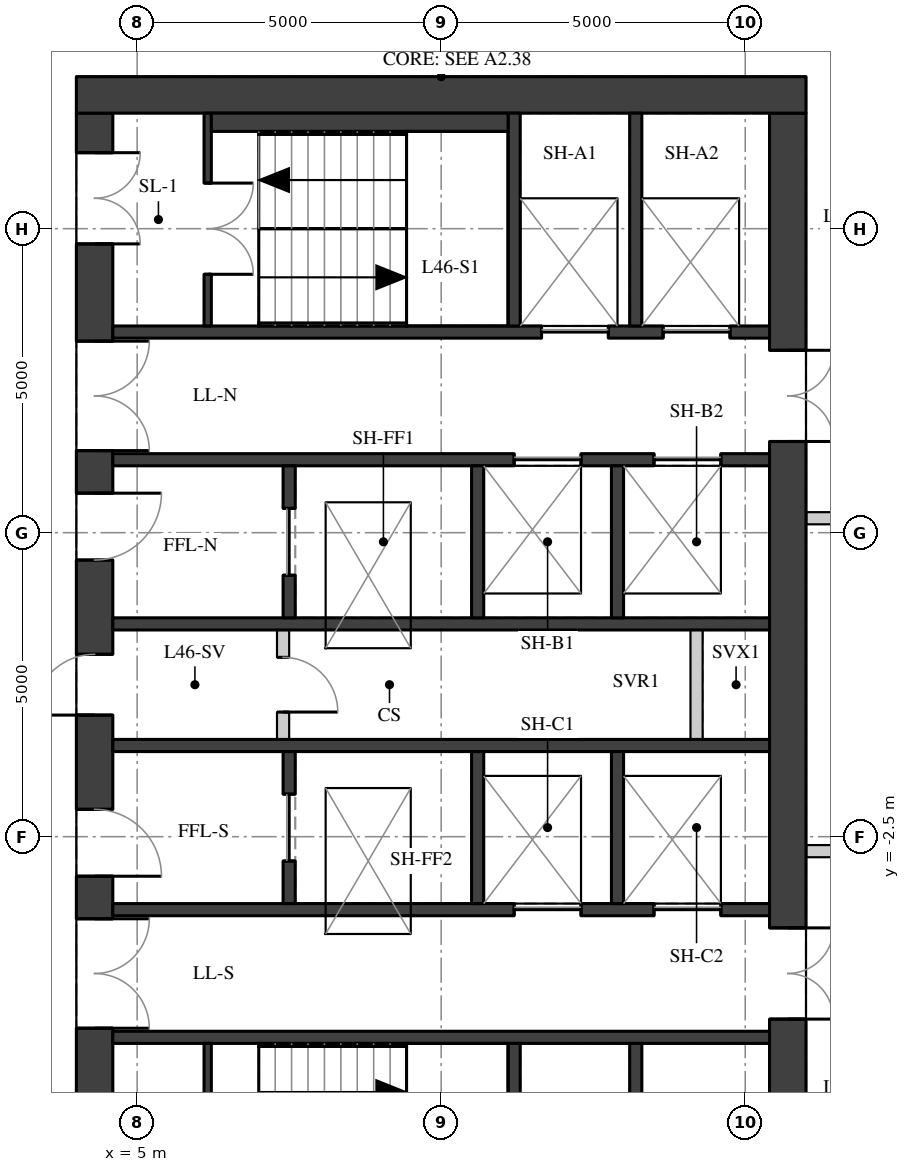
"""IFC4 building model, lengths in metres.
Left out: names, types, materials, properties, quantities, classifications, styles, units other than length and angle.
Written with IfcOpenShell. Run it as: python <this file> out.ifc"""

import sys

from ifc_helpers import new_model, si_unit, direction, frame, frame_2d, origin, place, context, subcontext, project, spatial, rectangle, extrude, element, fill, save


model = new_model("IFC4")
c1 = context("Model", 3, precision=1e-05, world=origin(), true_north=direction((0.0, 1.0)))
c2 = subcontext(c1, "Body", "Model", "MODEL_VIEW")
j1 = project(units=[si_unit("LENGTHUNIT", "METRE"), si_unit("PLANEANGLEUNIT", "RADIAN")], contexts=[c1])
p1 = place(None, origin())
s1 = spatial("IfcSite", under=j1, at=p1, CompositionType="ELEMENT")
p2 = place(p1, origin())
s2 = spatial("IfcBuilding", under=s1, at=p2, CompositionType="ELEMENT")
p3 = place(p2, frame((0.0, 0.0, 164.9)))
s3 = spatial("IfcBuildingStorey", under=s2, at=p3, CompositionType="ELEMENT", Elevation=164.9)
p4 = place(p3, frame((4.3, -9.4, 0.0), z_axis=(0.0, 0.0, 1.0), x_axis=(0.0, 1.0, 0.0)))
e1 = element("IfcWall", 1, at=p4, inside=s3, PredefinedType="SHEAR", context=c2, shape_type="SweptSolid", body=[
    extrude(rectangle(XDim=18.8, YDim=0.6, at=frame_2d((9.4, 0.0))), origin(), (0.0, 0.0, 1.0), 3.02),
])
p5 = place(p4, frame((0.65, 0.0, 0.0)))
e2 = element("IfcOpeningElement", 2, at=p5, cuts=e1, PredefinedType="OPENING", context=c2, shape_type="SweptSolid", body=[
    extrude(rectangle(XDim=1.5, YDim=2.1, at=frame_2d((0.75, 1.05))), frame((0.0, 0.31, 0.0), z_axis=(0.0, -1.0, 0.0), x_axis=(1.0, 0.0, 0.0)), (0.0, 0.0, 1.0), 0.62),
])
p6 = place(p4, frame((3.75, 0.0, 0.0)))
e3 = element("IfcOpeningElement", 3, at=p6, cuts=e1, PredefinedType="OPENING", context=c2, shape_type="SweptSolid", body=[
    extrude(rectangle(XDim=1.8, YDim=2.1, at=frame_2d((0.9, 1.05))), frame((0.0, 0.31, 0.0), z_axis=(0.0, -1.0, 0.0), x_axis=(1.0, 0.0, 0.0)), (0.0, 0.0, 1.0), 0.62),
])
p7 = place(p4, frame((6.25, 0.0, 0.0)))
e4 = element("IfcOpeningElement", 4, at=p7, cuts=e1, PredefinedType="OPENING", context=c2, shape_type="SweptSolid", body=[
    extrude(rectangle(XDim=1.1, YDim=2.1, at=frame_2d((0.55, 1.05))), frame((0.0, 0.31, 0.0), z_axis=(0.0, -1.0, 0.0), x_axis=(1.0, 0.0, 0.0)), (0.0, 0.0, 1.0), 0.62),
])
p8 = place(p4, frame((8.9, 0.0, 0.0)))
e5 = element("IfcOpeningElement", 5, at=p8, cuts=e1, PredefinedType="OPENING", context=c2, shape_type="SweptSolid", body=[
    extrude(rectangle(XDim=1.0, YDim=2.1, at=frame_2d((0.5, 1.05))), frame((0.0, 0.31, 0.0), z_axis=(0.0, -1.0, 0.0), x_axis=(1.0, 0.0, 0.0)), (0.0, 0.0, 1.0), 0.62),
])
p9 = place(p4, frame((11.45, 0.0, 0.0)))
e6 = element("IfcOpeningElement", 6, at=p9, cuts=e1, PredefinedType="OPENING", context=c2, shape_type="SweptSolid", body=[
    extrude(rectangle(XDim=1.1, YDim=2.1, at=frame_2d((0.55, 1.05))), frame((0.0, 0.31, 0.0), z_axis=(0.0, -1.0, 0.0), x_axis=(1.0, 0.0, 0.0)), (0.0, 0.0, 1.0), 0.62),
])
p10 = place(p4, frame((13.25, 0.0, 0.0)))
e7 = element("IfcOpeningElement", 7, at=p10, cuts=e1, PredefinedType="OPENING", context=c2, shape_type="SweptSolid", body=[
    extrude(rectangle(XDim=1.8, YDim=2.1, at=frame_2d((0.9, 1.05))), frame((0.0, 0.31, 0.0), z_axis=(0.0, -1.0, 0.0), x_axis=(1.0, 0.0, 0.0)), (0.0, 0.0, 1.0), 0.62),
])
p11 = place(p4, frame((16.65, 0.0, 0.0)))
e8 = element("IfcOpeningElement", 8, at=p11, cuts=e1, PredefinedType="OPENING", context=c2, shape_type="SweptSolid", body=[
    extrude(rectangle(XDim=1.5, YDim=2.1, at=frame_2d((0.75, 1.05))), frame((0.0, 0.31, 0.0), z_axis=(0.0, -1.0, 0.0), x_axis=(1.0, 0.0, 0.0)), (0.0, 0.0, 1.0), 0.62),
])
p12 = place(p3, frame((15.7, -9.4, 0.0), z_axis=(0.0, 0.0, 1.0), x_axis=(0.0, 1.0, 0.0)))
e9 = element("IfcWall", 9, at=p12, inside=s3, PredefinedType="SHEAR", context=c2, shape_type="SweptSolid", body=[
    extrude(rectangle(XDim=18.8, YDim=0.6, at=frame_2d((9.4, 0.0))), origin(), (0.0, 0.0, 1.0), 3.02),
])
p13 = place(p12, frame((13.4, 0.0, 0.0)))
e10 = element("IfcOpeningElement", 10, at=p13, cuts=e9, PredefinedType="OPENING", context=c2, shape_type="SweptSolid", body=[
    extrude(rectangle(XDim=1.5, YDim=2.1, at=frame_2d((0.75, 1.05))), frame((0.0, 0.31, 0.0), z_axis=(0.0, -1.0, 0.0), x_axis=(1.0, 0.0, 0.0)), (0.0, 0.0, 1.0), 0.62),
])
p14 = place(p12, frame((3.9, 0.0, 0.0)))
e11 = element("IfcOpeningElement", 11, at=p14, cuts=e9, PredefinedType="OPENING", context=c2, shape_type="SweptSolid", body=[
    extrude(rectangle(XDim=1.5, YDim=2.1, at=frame_2d((0.75, 1.05))), frame((0.0, 0.31, 0.0), z_axis=(0.0, -1.0, 0.0), x_axis=(1.0, 0.0, 0.0)), (0.0, 0.0, 1.0), 0.62),
])
p15 = place(p3, frame((4.0, 9.7, 0.0), z_axis=(0.0, 0.0, 1.0), x_axis=(1.0, 0.0, 0.0)))
e12 = element("IfcWall", 12, at=p15, inside=s3, PredefinedType="SHEAR", context=c2, shape_type="SweptSolid", body=[
    extrude(rectangle(XDim=12.0, YDim=0.6, at=frame_2d((6.0, 0.0))), origin(), (0.0, 0.0, 1.0), 3.02),
])
p16 = place(p3, frame((4.6, 5.8, 0.0), z_axis=(0.0, 0.0, 1.0), x_axis=(1.0, 0.0, 0.0)))
e13 = element("IfcWall", 13, at=p16, inside=s3, PredefinedType="SHEAR", context=c2, shape_type="SweptSolid", body=[
    extrude(rectangle(XDim=10.8, YDim=0.2, at=frame_2d((5.4, 0.0))), origin(), (0.0, 0.0, 1.0), 3.02),
])
p17 = place(p16, frame((7.05, 0.0, 0.0)))
e14 = element("IfcOpeningElement", 14, at=p17, cuts=e13, PredefinedType="OPENING", context=c2, shape_type="SweptSolid", body=[
    extrude(rectangle(XDim=1.1, YDim=2.1, at=frame_2d((0.55, 1.05))), frame((0.0, 0.11, 0.0), z_axis=(0.0, -1.0, 0.0), x_axis=(1.0, 0.0, 0.0)), (0.0, 0.0, 1.0), 0.22),
])
p18 = place(p16, frame((9.05, 0.0, 0.0)))
e15 = element("IfcOpeningElement", 15, at=p18, cuts=e13, PredefinedType="OPENING", context=c2, shape_type="SweptSolid", body=[
    extrude(rectangle(XDim=1.1, YDim=2.1, at=frame_2d((0.55, 1.05))), frame((0.0, 0.11, 0.0), z_axis=(0.0, -1.0, 0.0), x_axis=(1.0, 0.0, 0.0)), (0.0, 0.0, 1.0), 0.22),
])
p19 = place(p3, frame((4.6, 3.7, 0.0), z_axis=(0.0, 0.0, 1.0), x_axis=(1.0, 0.0, 0.0)))
e16 = element("IfcWall", 16, at=p19, inside=s3, PredefinedType="SHEAR", context=c2, shape_type="SweptSolid", body=[
    extrude(rectangle(XDim=10.8, YDim=0.2, at=frame_2d((5.4, 0.0))), origin(), (0.0, 0.0, 1.0), 3.02),
])
p20 = place(p19, frame((6.6, 0.0, 0.0)))
e17 = element("IfcOpeningElement", 17, at=p20, cuts=e16, PredefinedType="OPENING", context=c2, shape_type="SweptSolid", body=[
    extrude(rectangle(XDim=1.1, YDim=2.1, at=frame_2d((0.55, 1.05))), frame((0.0, 0.11, 0.0), z_axis=(0.0, -1.0, 0.0), x_axis=(1.0, 0.0, 0.0)), (0.0, 0.0, 1.0), 0.22),
])
p21 = place(p19, frame((8.9, 0.0, 0.0)))
e18 = element("IfcOpeningElement", 18, at=p21, cuts=e16, PredefinedType="OPENING", context=c2, shape_type="SweptSolid", body=[
    extrude(rectangle(XDim=1.1, YDim=2.1, at=frame_2d((0.55, 1.05))), frame((0.0, 0.11, 0.0), z_axis=(0.0, -1.0, 0.0), x_axis=(1.0, 0.0, 0.0)), (0.0, 0.0, 1.0), 0.22),
])
for number, where, z_axis, x_axis in (
    (19, (4.6, 1.0, 0.0), (0.0, 0.0, 1.0), (1.0, 0.0, 0.0)),
    (20, (4.6, -1.0, 0.0), (0.0, 0.0, 1.0), (1.0, 0.0, 0.0)),
):
    element("IfcWall", number, at=place(p3, frame(where, z_axis=z_axis, x_axis=x_axis)), inside=s3, PredefinedType="SHEAR", context=c2, shape_type="SweptSolid", body=[
        extrude(rectangle(XDim=10.8, YDim=0.2, at=frame_2d((5.4, 0.0))), origin(), (0.0, 0.0, 1.0), 3.02),
    ])
p22 = place(p3, frame((4.6, -3.7, 0.0), z_axis=(0.0, 0.0, 1.0), x_axis=(1.0, 0.0, 0.0)))
e21 = element("IfcWall", 21, at=p22, inside=s3, PredefinedType="SHEAR", context=c2, shape_type="SweptSolid", body=[
    extrude(rectangle(XDim=10.8, YDim=0.2, at=frame_2d((5.4, 0.0))), origin(), (0.0, 0.0, 1.0), 3.02),
])
p23 = place(p22, frame((6.6, 0.0, 0.0)))
e22 = element("IfcOpeningElement", 22, at=p23, cuts=e21, PredefinedType="OPENING", context=c2, shape_type="SweptSolid", body=[
    extrude(rectangle(XDim=1.1, YDim=2.1, at=frame_2d((0.55, 1.05))), frame((0.0, 0.11, 0.0), z_axis=(0.0, -1.0, 0.0), x_axis=(1.0, 0.0, 0.0)), (0.0, 0.0, 1.0), 0.22),
])
p24 = place(p22, frame((8.9, 0.0, 0.0)))
e23 = element("IfcOpeningElement", 23, at=p24, cuts=e21, PredefinedType="OPENING", context=c2, shape_type="SweptSolid", body=[
    extrude(rectangle(XDim=1.1, YDim=2.1, at=frame_2d((0.55, 1.05))), frame((0.0, 0.11, 0.0), z_axis=(0.0, -1.0, 0.0), x_axis=(1.0, 0.0, 0.0)), (0.0, 0.0, 1.0), 0.22),
])
p25 = place(p3, frame((4.6, -5.8, 0.0), z_axis=(0.0, 0.0, 1.0), x_axis=(1.0, 0.0, 0.0)))
e24 = element("IfcWall", 24, at=p25, inside=s3, PredefinedType="SHEAR", context=c2, shape_type="SweptSolid", body=[
    extrude(rectangle(XDim=10.8, YDim=0.2, at=frame_2d((5.4, 0.0))), origin(), (0.0, 0.0, 1.0), 3.02),
])
for number, where, z_axis, x_axis in (
    (25, (11.2, 5.9, 0.0), (0.0, 0.0, 1.0), (0.0, 1.0, 0.0)),
    (26, (11.2, -9.4, 0.0), (0.0, 0.0, 1.0), (0.0, 1.0, 0.0)),
    (27, (13.2, 5.9, 0.0), (0.0, 0.0, 1.0), (0.0, 1.0, 0.0)),
    (28, (13.2, -9.4, 0.0), (0.0, 0.0, 1.0), (0.0, 1.0, 0.0)),
):
    element("IfcWall", number, at=place(p3, frame(where, z_axis=z_axis, x_axis=x_axis)), inside=s3, PredefinedType="SHEAR", context=c2, shape_type="SweptSolid", body=[
        extrude(rectangle(XDim=3.5, YDim=0.2, at=frame_2d((1.75, 0.0))), origin(), (0.0, 0.0, 1.0), 3.02),
    ])
p26 = place(p3, frame((7.5, 1.1, 0.0), z_axis=(0.0, 0.0, 1.0), x_axis=(0.0, 1.0, 0.0)))
e29 = element("IfcWall", 29, at=p26, inside=s3, PredefinedType="SHEAR", context=c2, shape_type="SweptSolid", body=[
    extrude(rectangle(XDim=2.5, YDim=0.2, at=frame_2d((1.25, 0.0))), origin(), (0.0, 0.0, 1.0), 3.02),
])
p27 = place(p26, frame((0.7, 0.0, 0.0)))
e30 = element("IfcOpeningElement", 30, at=p27, cuts=e29, PredefinedType="OPENING", context=c2, shape_type="SweptSolid", body=[
    extrude(rectangle(XDim=1.1, YDim=2.1, at=frame_2d((0.55, 1.05))), frame((0.0, 0.11, 0.0), z_axis=(0.0, -1.0, 0.0), x_axis=(1.0, 0.0, 0.0)), (0.0, 0.0, 1.0), 0.22),
])
p28 = place(p3, frame((7.5, -3.6, 0.0), z_axis=(0.0, 0.0, 1.0), x_axis=(0.0, 1.0, 0.0)))
e31 = element("IfcWall", 31, at=p28, inside=s3, PredefinedType="SHEAR", context=c2, shape_type="SweptSolid", body=[
    extrude(rectangle(XDim=2.5, YDim=0.2, at=frame_2d((1.25, 0.0))), origin(), (0.0, 0.0, 1.0), 3.02),
])
p29 = place(p28, frame((0.7, 0.0, 0.0)))
e32 = element("IfcOpeningElement", 32, at=p29, cuts=e31, PredefinedType="OPENING", context=c2, shape_type="SweptSolid", body=[
    extrude(rectangle(XDim=1.1, YDim=2.1, at=frame_2d((0.55, 1.05))), frame((0.0, 0.11, 0.0), z_axis=(0.0, -1.0, 0.0), x_axis=(1.0, 0.0, 0.0)), (0.0, 0.0, 1.0), 0.22),
])
for number, where, z_axis, x_axis in (
    (33, (10.6, 1.1, 0.0), (0.0, 0.0, 1.0), (0.0, 1.0, 0.0)),
    (34, (10.6, -3.6, 0.0), (0.0, 0.0, 1.0), (0.0, 1.0, 0.0)),
    (35, (12.9, 1.1, 0.0), (0.0, 0.0, 1.0), (0.0, 1.0, 0.0)),
    (36, (12.9, -3.6, 0.0), (0.0, 0.0, 1.0), (0.0, 1.0, 0.0)),
):
    element("IfcWall", number, at=place(p3, frame(where, z_axis=z_axis, x_axis=x_axis)), inside=s3, PredefinedType="SHEAR", context=c2, shape_type="SweptSolid", body=[
        extrude(rectangle(XDim=2.5, YDim=0.2, at=frame_2d((1.25, 0.0))), origin(), (0.0, 0.0, 1.0), 3.02),
    ])
p30 = place(p3, frame((6.16, 5.9, 0.0), z_axis=(0.0, 0.0, 1.0), x_axis=(0.0, 1.0, 0.0)))
e37 = element("IfcWall", 37, at=p30, inside=s3, PredefinedType="SHEAR", context=c2, shape_type="SweptSolid", body=[
    extrude(rectangle(XDim=3.5, YDim=0.12, at=frame_2d((1.75, 0.0))), origin(), (0.0, 0.0, 1.0), 3.02),
])
p31 = place(p30, frame((0.85, 0.0, 0.0)))
e38 = element("IfcOpeningElement", 38, at=p31, cuts=e37, PredefinedType="OPENING", context=c2, shape_type="SweptSolid", body=[
    extrude(rectangle(XDim=1.5, YDim=2.1, at=frame_2d((0.75, 1.05))), frame((0.0, 0.07, 0.0), z_axis=(0.0, -1.0, 0.0), x_axis=(1.0, 0.0, 0.0)), (0.0, 0.0, 1.0), 0.14),
])
p32 = place(p3, frame((6.16, -9.4, 0.0), z_axis=(0.0, 0.0, 1.0), x_axis=(0.0, 1.0, 0.0)))
e39 = element("IfcWall", 39, at=p32, inside=s3, PredefinedType="SHEAR", context=c2, shape_type="SweptSolid", body=[
    extrude(rectangle(XDim=3.5, YDim=0.12, at=frame_2d((1.75, 0.0))), origin(), (0.0, 0.0, 1.0), 3.02),
])
p33 = place(p32, frame((1.15, 0.0, 0.0)))
e40 = element("IfcOpeningElement", 40, at=p33, cuts=e39, PredefinedType="OPENING", context=c2, shape_type="SweptSolid", body=[
    extrude(rectangle(XDim=1.5, YDim=2.1, at=frame_2d((0.75, 1.05))), frame((0.0, 0.07, 0.0), z_axis=(0.0, -1.0, 0.0), x_axis=(1.0, 0.0, 0.0)), (0.0, 0.0, 1.0), 0.14),
])
p34 = place(p3, frame((7.4, -0.9, 0.0), z_axis=(0.0, 0.0, 1.0), x_axis=(0.0, 1.0, 0.0)))
e41 = element("IfcWall", 41, at=p34, inside=s3, PredefinedType="PARTITIONING", context=c2, shape_type="SweptSolid", body=[
    extrude(rectangle(XDim=1.8, YDim=0.2, at=frame_2d((0.9, 0.0))), origin(), (0.0, 0.0, 1.0), 3.02),
])
p35 = place(p34, frame((0.45, 0.0, 0.0)))
e42 = element("IfcOpeningElement", 42, at=p35, cuts=e41, PredefinedType="OPENING", context=c2, shape_type="SweptSolid", body=[
    extrude(rectangle(XDim=0.9, YDim=2.1, at=frame_2d((0.45, 1.05))), frame((0.0, 0.11, 0.0), z_axis=(0.0, -1.0, 0.0), x_axis=(1.0, 0.0, 0.0)), (0.0, 0.0, 1.0), 0.22),
])
p36 = place(p3, frame((14.2, -0.9, 0.0), z_axis=(0.0, 0.0, 1.0), x_axis=(0.0, 1.0, 0.0)))
e43 = element("IfcWall", 43, at=p36, inside=s3, PredefinedType="PARTITIONING", context=c2, shape_type="SweptSolid", body=[
    extrude(rectangle(XDim=1.8, YDim=0.2, at=frame_2d((0.9, 0.0))), origin(), (0.0, 0.0, 1.0), 3.02),
])
p37 = place(p3, frame((6.22, 9.25, 0.0), z_axis=(0.0, 0.0, 1.0), x_axis=(1.0, 0.0, 0.0)))
e44 = element("IfcWall", 44, at=p37, inside=s3, PredefinedType="PARTITIONING", context=c2, shape_type="SweptSolid", body=[
    extrude(rectangle(XDim=4.88, YDim=0.3, at=frame_2d((2.44, 0.0))), origin(), (0.0, 0.0, 1.0), 3.02),
])
p38 = place(p3, frame((17.5, 2.738, 0.0), z_axis=(0.0, 0.0, 1.0), x_axis=(-1.0, 0.0, 0.0)))
e45 = element("IfcWall", 45, at=p38, inside=s3, PredefinedType="PARTITIONING", context=c2, shape_type="SweptSolid", body=[
    extrude(rectangle(XDim=1.496, YDim=0.2, at=frame_2d((0.748, 0.0))), origin(), (0.0, 0.0, 1.0), 3.02),
])
p39 = place(p3, frame((16.004, -2.738, 0.0), z_axis=(0.0, 0.0, 1.0), x_axis=(1.0, 0.0, 0.0)))
e46 = element("IfcWall", 46, at=p39, inside=s3, PredefinedType="PARTITIONING", context=c2, shape_type="SweptSolid", body=[
    extrude(rectangle(XDim=1.596, YDim=0.2, at=frame_2d((0.798, 0.0))), origin(), (0.0, 0.0, 1.0), 3.02),
])
p40 = place(p6, origin())
e47 = element("IfcDoor", 47, at=p40, inside=s3, OperationType="DOUBLE_DOOR_SINGLE_SWING", PredefinedType="DOOR", context=c2, shape_type="SweptSolid", body=[
    extrude(rectangle(XDim=1.8, YDim=2.1, at=frame_2d((0.9, 1.05))), frame((0.0, 0.025, 0.0), z_axis=(0.0, -1.0, 0.0), x_axis=(1.0, 0.0, 0.0)), (0.0, 0.0, 1.0), 0.05),
])
fill(e3, e47)
p41 = place(p7, origin())
e48 = element("IfcDoor", 48, at=p41, inside=s3, OperationType="SINGLE_SWING_RIGHT", PredefinedType="DOOR", context=c2, shape_type="SweptSolid", body=[
    extrude(rectangle(XDim=1.1, YDim=2.1, at=frame_2d((0.55, 1.05))), frame((0.0, 0.025, 0.0), z_axis=(0.0, -1.0, 0.0), x_axis=(1.0, 0.0, 0.0)), (0.0, 0.0, 1.0), 0.05),
])
fill(e4, e48)
p42 = place(p8, origin())
e49 = element("IfcDoor", 49, at=p42, inside=s3, OperationType="SINGLE_SWING_LEFT", PredefinedType="DOOR", context=c2, shape_type="SweptSolid", body=[
    extrude(rectangle(XDim=1.0, YDim=2.1, at=frame_2d((0.5, 1.05))), frame((0.0, 0.025, 0.0), z_axis=(0.0, -1.0, 0.0), x_axis=(1.0, 0.0, 0.0)), (0.0, 0.0, 1.0), 0.05),
])
fill(e5, e49)
p43 = place(p9, origin())
e50 = element("IfcDoor", 50, at=p43, inside=s3, OperationType="SINGLE_SWING_LEFT", PredefinedType="DOOR", context=c2, shape_type="SweptSolid", body=[
    extrude(rectangle(XDim=1.1, YDim=2.1, at=frame_2d((0.55, 1.05))), frame((0.0, 0.025, 0.0), z_axis=(0.0, -1.0, 0.0), x_axis=(1.0, 0.0, 0.0)), (0.0, 0.0, 1.0), 0.05),
])
fill(e6, e50)
p44 = place(p10, origin())
e51 = element("IfcDoor", 51, at=p44, inside=s3, OperationType="DOUBLE_DOOR_SINGLE_SWING", PredefinedType="DOOR", context=c2, shape_type="SweptSolid", body=[
    extrude(rectangle(XDim=1.8, YDim=2.1, at=frame_2d((0.9, 1.05))), frame((0.0, 0.025, 0.0), z_axis=(0.0, -1.0, 0.0), x_axis=(1.0, 0.0, 0.0)), (0.0, 0.0, 1.0), 0.05),
])
fill(e7, e51)
p45 = place(p11, origin())
e52 = element("IfcDoor", 52, at=p45, inside=s3, OperationType="DOUBLE_DOOR_SINGLE_SWING", PredefinedType="DOOR", context=c2, shape_type="SweptSolid", body=[
    extrude(rectangle(XDim=1.5, YDim=2.1, at=frame_2d((0.75, 1.05))), frame((0.0, 0.025, 0.0), z_axis=(0.0, -1.0, 0.0), x_axis=(1.0, 0.0, 0.0)), (0.0, 0.0, 1.0), 0.05),
])
fill(e8, e52)
p46 = place(p13, origin())
e53 = element("IfcDoor", 53, at=p46, inside=s3, OperationType="DOUBLE_DOOR_SINGLE_SWING", PredefinedType="DOOR", context=c2, shape_type="SweptSolid", body=[
    extrude(rectangle(XDim=1.5, YDim=2.1, at=frame_2d((0.75, 1.05))), frame((0.0, 0.025, 0.0), z_axis=(0.0, -1.0, 0.0), x_axis=(1.0, 0.0, 0.0)), (0.0, 0.0, 1.0), 0.05),
])
fill(e10, e53)
p47 = place(p14, origin())
e54 = element("IfcDoor", 54, at=p47, inside=s3, OperationType="DOUBLE_DOOR_SINGLE_SWING", PredefinedType="DOOR", context=c2, shape_type="SweptSolid", body=[
    extrude(rectangle(XDim=1.5, YDim=2.1, at=frame_2d((0.75, 1.05))), frame((0.0, 0.025, 0.0), z_axis=(0.0, -1.0, 0.0), x_axis=(1.0, 0.0, 0.0)), (0.0, 0.0, 1.0), 0.05),
])
fill(e11, e54)
p48 = place(p31, origin())
e55 = element("IfcDoor", 55, at=p48, inside=s3, OperationType="DOUBLE_DOOR_SINGLE_SWING", PredefinedType="DOOR", context=c2, shape_type="SweptSolid", body=[
    extrude(rectangle(XDim=1.5, YDim=2.1, at=frame_2d((0.75, 1.05))), frame((0.0, 0.025, 0.0), z_axis=(0.0, -1.0, 0.0), x_axis=(1.0, 0.0, 0.0)), (0.0, 0.0, 1.0), 0.05),
])
fill(e38, e55)
p49 = place(p17, origin())
e56 = element("IfcDoor", 56, at=p49, inside=s3, OperationType="DOUBLE_DOOR_SLIDING", PredefinedType="DOOR", context=c2, shape_type="SweptSolid", body=[
    extrude(rectangle(XDim=1.1, YDim=2.1, at=frame_2d((0.55, 1.05))), frame((0.0, 0.025, 0.0), z_axis=(0.0, -1.0, 0.0), x_axis=(1.0, 0.0, 0.0)), (0.0, 0.0, 1.0), 0.05),
])
fill(e14, e56)
p50 = place(p18, origin())
e57 = element("IfcDoor", 57, at=p50, inside=s3, OperationType="DOUBLE_DOOR_SLIDING", PredefinedType="DOOR", context=c2, shape_type="SweptSolid", body=[
    extrude(rectangle(XDim=1.1, YDim=2.1, at=frame_2d((0.55, 1.05))), frame((0.0, 0.025, 0.0), z_axis=(0.0, -1.0, 0.0), x_axis=(1.0, 0.0, 0.0)), (0.0, 0.0, 1.0), 0.05),
])
fill(e15, e57)
p51 = place(p20, origin())
e58 = element("IfcDoor", 58, at=p51, inside=s3, OperationType="DOUBLE_DOOR_SLIDING", PredefinedType="DOOR", context=c2, shape_type="SweptSolid", body=[
    extrude(rectangle(XDim=1.1, YDim=2.1, at=frame_2d((0.55, 1.05))), frame((0.0, 0.025, 0.0), z_axis=(0.0, -1.0, 0.0), x_axis=(1.0, 0.0, 0.0)), (0.0, 0.0, 1.0), 0.05),
])
fill(e17, e58)
p52 = place(p21, origin())
e59 = element("IfcDoor", 59, at=p52, inside=s3, OperationType="DOUBLE_DOOR_SLIDING", PredefinedType="DOOR", context=c2, shape_type="SweptSolid", body=[
    extrude(rectangle(XDim=1.1, YDim=2.1, at=frame_2d((0.55, 1.05))), frame((0.0, 0.025, 0.0), z_axis=(0.0, -1.0, 0.0), x_axis=(1.0, 0.0, 0.0)), (0.0, 0.0, 1.0), 0.05),
])
fill(e18, e59)
p53 = place(p23, origin())
e60 = element("IfcDoor", 60, at=p53, inside=s3, OperationType="DOUBLE_DOOR_SLIDING", PredefinedType="DOOR", context=c2, shape_type="SweptSolid", body=[
    extrude(rectangle(XDim=1.1, YDim=2.1, at=frame_2d((0.55, 1.05))), frame((0.0, 0.025, 0.0), z_axis=(0.0, -1.0, 0.0), x_axis=(1.0, 0.0, 0.0)), (0.0, 0.0, 1.0), 0.05),
])
fill(e22, e60)
p54 = place(p24, origin())
e61 = element("IfcDoor", 61, at=p54, inside=s3, OperationType="DOUBLE_DOOR_SLIDING", PredefinedType="DOOR", context=c2, shape_type="SweptSolid", body=[
    extrude(rectangle(XDim=1.1, YDim=2.1, at=frame_2d((0.55, 1.05))), frame((0.0, 0.025, 0.0), z_axis=(0.0, -1.0, 0.0), x_axis=(1.0, 0.0, 0.0)), (0.0, 0.0, 1.0), 0.05),
])
fill(e23, e61)
p55 = place(p27, origin())
e62 = element("IfcDoor", 62, at=p55, inside=s3, OperationType="DOUBLE_DOOR_SLIDING", PredefinedType="DOOR", context=c2, shape_type="SweptSolid", body=[
    extrude(rectangle(XDim=1.1, YDim=2.1, at=frame_2d((0.55, 1.05))), frame((0.0, 0.025, 0.0), z_axis=(0.0, -1.0, 0.0), x_axis=(1.0, 0.0, 0.0)), (0.0, 0.0, 1.0), 0.05),
])
fill(e30, e62)
p56 = place(p29, origin())
e63 = element("IfcDoor", 63, at=p56, inside=s3, OperationType="DOUBLE_DOOR_SLIDING", PredefinedType="DOOR", context=c2, shape_type="SweptSolid", body=[
    extrude(rectangle(XDim=1.1, YDim=2.1, at=frame_2d((0.55, 1.05))), frame((0.0, 0.025, 0.0), z_axis=(0.0, -1.0, 0.0), x_axis=(1.0, 0.0, 0.0)), (0.0, 0.0, 1.0), 0.05),
])
fill(e32, e63)
p57 = place(p35, origin())
e64 = element("IfcDoor", 64, at=p57, inside=s3, OperationType="SINGLE_SWING_RIGHT", PredefinedType="DOOR", context=c2, shape_type="SweptSolid", body=[
    extrude(rectangle(XDim=0.9, YDim=2.1, at=frame_2d((0.45, 1.05))), frame((0.0, 0.025, 0.0), z_axis=(0.0, -1.0, 0.0), x_axis=(1.0, 0.0, 0.0)), (0.0, 0.0, 1.0), 0.05),
])
fill(e42, e64)
save(model, sys.argv[1])
